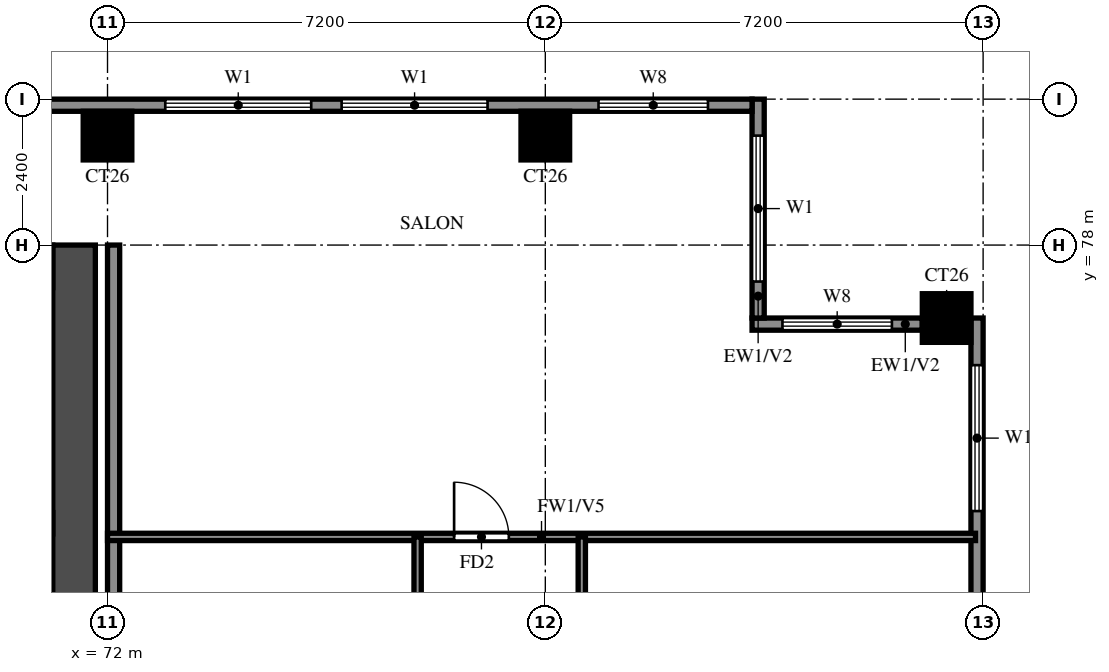
"""IFC4 building model, lengths in metres.
Left out: names, types, materials, properties, quantities, classifications, styles, units other than length and angle.
Written with IfcOpenShell. Run it as: python <this file> out.ifc"""

import sys

from ifc_helpers import new_model, si_unit, direction, frame, frame_2d, origin, origin_2d, place, context, subcontext, project, spatial, rectangle, extrude, source, transform, mapped, element, fill, save


model = new_model("IFC4")
c1 = context("Model", 3, precision=1e-05, world=origin(), true_north=direction((0.0, 1.0)))
c2 = subcontext(c1, "Body", "Model", "MODEL_VIEW")
j1 = project(units=[si_unit("LENGTHUNIT", "METRE"), si_unit("PLANEANGLEUNIT", "RADIAN")], contexts=[c1])
p1 = place(None, origin())
s1 = spatial("IfcSite", under=j1, at=p1, CompositionType="ELEMENT")
p2 = place(p1, origin())
s2 = spatial("IfcBuilding", under=s1, at=p2, CompositionType="ELEMENT")
p3 = place(p2, frame((0.0, 0.0, 178.0)))
s3 = spatial("IfcBuildingStorey", under=s2, at=p3, CompositionType="ELEMENT", Elevation=178.0)
m1 = source(origin(), c2, "Body", "SweptSolid", [
    extrude(rectangle(XDim=0.8, YDim=0.8, at=origin_2d()), origin(), (0.0, 0.0, 1.0), 3.2),
])
for number, where, z_axis, x_axis in (
    (1, (85.8, 76.8, 0.0), (0.0, 0.0, 1.0), (1.0, 0.0, 0.0)),
    (2, (72.0, 79.8, 0.0), (0.0, 0.0, 1.0), (1.0, 0.0, 0.0)),
    (3, (79.2, 79.8, 0.0), (0.0, 0.0, 1.0), (1.0, 0.0, 0.0)),
):
    element("IfcColumn", number, at=place(p3, frame(where, z_axis=z_axis, x_axis=x_axis)), inside=s3, PredefinedType="COLUMN", context=c2, shape_type="MappedRepresentation", body=[
        mapped(m1, transform((0.0, 0.0, 0.0))),
    ])
p4 = place(p3, frame((71.45, 66.1, 0.0), z_axis=(0.0, 0.0, 1.0), x_axis=(0.0, 1.0, 0.0)))
e4 = element("IfcWall", 4, at=p4, inside=s3, PredefinedType="SHEAR", context=c2, shape_type="SweptSolid", body=[
    extrude(rectangle(XDim=11.9, YDim=0.7, at=frame_2d((5.95, 0.0))), origin(), (0.0, 0.0, 1.0), 3.2),
])
p5 = place(p3, frame((29.7, 77.65, 0.0), z_axis=(0.0, 0.0, 1.0), x_axis=(1.0, 0.0, 0.0)))
e5 = element("IfcWall", 5, at=p5, inside=s3, PredefinedType="SHEAR", context=c2, shape_type="SweptSolid", body=[
    extrude(rectangle(XDim=41.4, YDim=0.7, at=frame_2d((20.7, 0.0))), origin(), (0.0, 0.0, 1.0), 3.2),
])
p6 = place(p3, frame((86.3, 48.2, 0.0), z_axis=(0.0, 0.0, 1.0), x_axis=(0.0, 1.0, 0.0)))
e6 = element("IfcWall", 6, at=p6, inside=s3, PredefinedType="SOLIDWALL", context=c2, shape_type="SweptSolid", body=[
    extrude(rectangle(XDim=28.6, YDim=0.2, at=frame_2d((14.3, 0.0))), origin(), (0.0, 0.0, 1.0), 3.2),
])
p7 = place(p6, frame((11.5, 0.0, 0.0)))
e7 = element("IfcOpeningElement", 7, at=p7, cuts=e6, PredefinedType="OPENING", context=c2, shape_type="SweptSolid", body=[
    extrude(rectangle(XDim=1.8, YDim=2.4, at=frame_2d((0.9, 1.2))), frame((0.0, 0.11, 0.0), z_axis=(0.0, -1.0, 0.0), x_axis=(1.0, 0.0, 0.0)), (0.0, 0.0, 1.0), 0.22),
])
p8 = place(p6, frame((0.783, 0.0, 0.6)))
e8 = element("IfcOpeningElement", 8, at=p8, cuts=e6, PredefinedType="OPENING", context=c2, shape_type="SweptSolid", body=[
    extrude(rectangle(XDim=2.4, YDim=2.4, at=frame_2d((1.2, 1.2))), frame((0.0, 0.11, 0.0), z_axis=(0.0, -1.0, 0.0), x_axis=(1.0, 0.0, 0.0)), (0.0, 0.0, 1.0), 0.22),
])
p9 = place(p6, frame((3.667, 0.0, 0.6)))
e9 = element("IfcOpeningElement", 9, at=p9, cuts=e6, PredefinedType="OPENING", context=c2, shape_type="SweptSolid", body=[
    extrude(rectangle(XDim=2.4, YDim=2.4, at=frame_2d((1.2, 1.2))), frame((0.0, 0.11, 0.0), z_axis=(0.0, -1.0, 0.0), x_axis=(1.0, 0.0, 0.0)), (0.0, 0.0, 1.0), 0.22),
])
p10 = place(p6, frame((7.475, 0.0, 0.6)))
e10 = element("IfcOpeningElement", 10, at=p10, cuts=e6, PredefinedType="OPENING", context=c2, shape_type="SweptSolid", body=[
    extrude(rectangle(XDim=1.8, YDim=2.4, at=frame_2d((0.9, 1.2))), frame((0.0, 0.11, 0.0), z_axis=(0.0, -1.0, 0.0), x_axis=(1.0, 0.0, 0.0)), (0.0, 0.0, 1.0), 0.22),
])
p11 = place(p6, frame((14.675, 0.0, 0.6)))
e11 = element("IfcOpeningElement", 11, at=p11, cuts=e6, PredefinedType="OPENING", context=c2, shape_type="SweptSolid", body=[
    extrude(rectangle(XDim=1.2, YDim=2.4, at=frame_2d((0.6, 1.2))), frame((0.0, 0.11, 0.0), z_axis=(0.0, -1.0, 0.0), x_axis=(1.0, 0.0, 0.0)), (0.0, 0.0, 1.0), 0.22),
])
p12 = place(p6, frame((17.625, 0.0, 0.6)))
e12 = element("IfcOpeningElement", 12, at=p12, cuts=e6, PredefinedType="OPENING", context=c2, shape_type="SweptSolid", body=[
    extrude(rectangle(XDim=2.4, YDim=2.4, at=frame_2d((1.2, 1.2))), frame((0.0, 0.11, 0.0), z_axis=(0.0, -1.0, 0.0), x_axis=(1.0, 0.0, 0.0)), (0.0, 0.0, 1.0), 0.22),
])
p13 = place(p6, frame((22.925, 0.0, 1.5)))
e13 = element("IfcOpeningElement", 13, at=p13, cuts=e6, PredefinedType="OPENING", context=c2, shape_type="SweptSolid", body=[
    extrude(rectangle(XDim=0.9, YDim=0.9, at=frame_2d((0.45, 0.45))), frame((0.0, 0.11, 0.0), z_axis=(0.0, -1.0, 0.0), x_axis=(1.0, 0.0, 0.0)), (0.0, 0.0, 1.0), 0.22),
])
p14 = place(p6, frame((25.425, 0.0, 0.6)))
e14 = element("IfcOpeningElement", 14, at=p14, cuts=e6, PredefinedType="OPENING", context=c2, shape_type="SweptSolid", body=[
    extrude(rectangle(XDim=2.4, YDim=2.4, at=frame_2d((1.2, 1.2))), frame((0.0, 0.11, 0.0), z_axis=(0.0, -1.0, 0.0), x_axis=(1.0, 0.0, 0.0)), (0.0, 0.0, 1.0), 0.22),
])
p15 = place(p3, frame((85.4, 76.7, 0.0), z_axis=(0.0, 0.0, 1.0), x_axis=(-1.0, 0.0, 0.0)))
e15 = element("IfcWall", 15, at=p15, inside=s3, PredefinedType="SOLIDWALL", context=c2, shape_type="SweptSolid", body=[
    extrude(rectangle(XDim=2.8, YDim=0.2, at=frame_2d((1.4, 0.0))), origin(), (0.0, 0.0, 1.0), 3.2),
])
p16 = place(p15, frame((0.5, 0.0, 0.6)))
e16 = element("IfcOpeningElement", 16, at=p16, cuts=e15, PredefinedType="OPENING", context=c2, shape_type="SweptSolid", body=[
    extrude(rectangle(XDim=1.8, YDim=2.4, at=frame_2d((0.9, 1.2))), frame((0.0, 0.11, 0.0), z_axis=(0.0, -1.0, 0.0), x_axis=(1.0, 0.0, 0.0)), (0.0, 0.0, 1.0), 0.22),
])
p17 = place(p3, frame((82.7, 76.8, 0.0), z_axis=(0.0, 0.0, 1.0), x_axis=(0.0, 1.0, 0.0)))
e17 = element("IfcWall", 17, at=p17, inside=s3, PredefinedType="SOLIDWALL", context=c2, shape_type="SweptSolid", body=[
    extrude(rectangle(XDim=3.6, YDim=0.2, at=frame_2d((1.8, 0.0))), origin(), (0.0, 0.0, 1.0), 3.2),
])
p18 = place(p17, frame((0.6, 0.0, 0.6)))
e18 = element("IfcOpeningElement", 18, at=p18, cuts=e17, PredefinedType="OPENING", context=c2, shape_type="SweptSolid", body=[
    extrude(rectangle(XDim=2.4, YDim=2.4, at=frame_2d((1.2, 1.2))), frame((0.0, 0.11, 0.0), z_axis=(0.0, -1.0, 0.0), x_axis=(1.0, 0.0, 0.0)), (0.0, 0.0, 1.0), 0.22),
])
p19 = place(p3, frame((82.6, 80.3, 0.0), z_axis=(0.0, 0.0, 1.0), x_axis=(-1.0, 0.0, 0.0)))
e19 = element("IfcWall", 19, at=p19, inside=s3, PredefinedType="SOLIDWALL", context=c2, shape_type="SweptSolid", body=[
    extrude(rectangle(XDim=53.8, YDim=0.2, at=frame_2d((26.9, 0.0))), origin(), (0.0, 0.0, 1.0), 3.2),
])
p20 = place(p19, frame((0.725, 0.0, 0.6)))
e20 = element("IfcOpeningElement", 20, at=p20, cuts=e19, PredefinedType="OPENING", context=c2, shape_type="SweptSolid", body=[
    extrude(rectangle(XDim=1.8, YDim=2.4, at=frame_2d((0.9, 1.2))), frame((0.0, 0.11, 0.0), z_axis=(0.0, -1.0, 0.0), x_axis=(1.0, 0.0, 0.0)), (0.0, 0.0, 1.0), 0.22),
])
p21 = place(p19, frame((4.35, 0.0, 0.6)))
e21 = element("IfcOpeningElement", 21, at=p21, cuts=e19, PredefinedType="OPENING", context=c2, shape_type="SweptSolid", body=[
    extrude(rectangle(XDim=2.4, YDim=2.4, at=frame_2d((1.2, 1.2))), frame((0.0, 0.11, 0.0), z_axis=(0.0, -1.0, 0.0), x_axis=(1.0, 0.0, 0.0)), (0.0, 0.0, 1.0), 0.22),
])
p22 = place(p19, frame((7.25, 0.0, 0.6)))
e22 = element("IfcOpeningElement", 22, at=p22, cuts=e19, PredefinedType="OPENING", context=c2, shape_type="SweptSolid", body=[
    extrude(rectangle(XDim=2.4, YDim=2.4, at=frame_2d((1.2, 1.2))), frame((0.0, 0.11, 0.0), z_axis=(0.0, -1.0, 0.0), x_axis=(1.0, 0.0, 0.0)), (0.0, 0.0, 1.0), 0.22),
])
p23 = place(p3, frame((72.1, 62.4, 0.0), z_axis=(0.0, 0.0, 1.0), x_axis=(0.0, 1.0, 0.0)))
e23 = element("IfcWall", 23, at=p23, inside=s3, PredefinedType="SOLIDWALL", context=c2, shape_type="SweptSolid", body=[
    extrude(rectangle(XDim=15.6, YDim=0.2, at=frame_2d((7.8, 0.0))), origin(), (0.0, 0.0, 1.0), 3.2),
])
p24 = place(p3, frame((72.0, 73.2, 0.0), z_axis=(0.0, 0.0, 1.0), x_axis=(1.0, 0.0, 0.0)))
e24 = element("IfcWall", 24, at=p24, inside=s3, PredefinedType="PARTITIONING", context=c2, shape_type="SweptSolid", body=[
    extrude(rectangle(XDim=14.275, YDim=0.12, at=frame_2d((7.137, 0.0))), origin(), (0.0, 0.0, 1.0), 2.3),
])
p25 = place(p24, frame((5.7, 0.0, 0.0)))
e25 = element("IfcOpeningElement", 25, at=p25, cuts=e24, PredefinedType="OPENING", context=c2, shape_type="SweptSolid", body=[
    extrude(rectangle(XDim=0.9, YDim=2.1, at=frame_2d((0.45, 1.05))), frame((0.0, 0.07, 0.0), z_axis=(0.0, -1.0, 0.0), x_axis=(1.0, 0.0, 0.0)), (0.0, 0.0, 1.0), 0.14),
])
p26 = place(p3, frame((77.1, 61.2, 0.0), z_axis=(0.0, 0.0, 1.0), x_axis=(0.0, 1.0, 0.0)))
e26 = element("IfcWall", 26, at=p26, inside=s3, PredefinedType="PARTITIONING", context=c2, shape_type="SweptSolid", body=[
    extrude(rectangle(XDim=12.0, YDim=0.12, at=frame_2d((6.0, 0.0))), origin(), (0.0, 0.0, 1.0), 3.2),
])
p27 = place(p26, frame((4.55, 0.0, 0.0)))
e27 = element("IfcOpeningElement", 27, at=p27, cuts=e26, PredefinedType="OPENING", context=c2, shape_type="SweptSolid", body=[
    extrude(rectangle(XDim=0.9, YDim=2.1, at=frame_2d((0.45, 1.05))), frame((0.0, 0.07, 0.0), z_axis=(0.0, -1.0, 0.0), x_axis=(1.0, 0.0, 0.0)), (0.0, 0.0, 1.0), 0.14),
])
p28 = place(p26, frame((9.3, 0.0, 0.0)))
e28 = element("IfcOpeningElement", 28, at=p28, cuts=e26, PredefinedType="OPENING", context=c2, shape_type="SweptSolid", body=[
    extrude(rectangle(XDim=0.8, YDim=2.1, at=frame_2d((0.4, 1.05))), frame((0.0, 0.07, 0.0), z_axis=(0.0, -1.0, 0.0), x_axis=(1.0, 0.0, 0.0)), (0.0, 0.0, 1.0), 0.14),
])
p29 = place(p3, frame((79.8, 69.6, 0.0), z_axis=(0.0, 0.0, 1.0), x_axis=(0.0, 1.0, 0.0)))
e29 = element("IfcWall", 29, at=p29, inside=s3, PredefinedType="PARTITIONING", context=c2, shape_type="SweptSolid", body=[
    extrude(rectangle(XDim=3.6, YDim=0.12, at=frame_2d((1.8, 0.0))), origin(), (0.0, 0.0, 1.0), 3.2),
])
p30 = place(p14, origin())
e30 = element("IfcWindow", 30, at=p30, inside=s3, PartitioningType="DOUBLE_PANEL_VERTICAL", PredefinedType="WINDOW", context=c2, shape_type="SweptSolid", body=[
    extrude(rectangle(XDim=2.4, YDim=2.4, at=frame_2d((1.2, 1.2))), frame((0.0, 0.03, 0.0), z_axis=(0.0, -1.0, 0.0), x_axis=(1.0, 0.0, 0.0)), (0.0, 0.0, 1.0), 0.06),
])
fill(e14, e30)
p31 = place(p16, origin())
e31 = element("IfcWindow", 31, at=p31, inside=s3, PartitioningType="DOUBLE_PANEL_VERTICAL", PredefinedType="WINDOW", context=c2, shape_type="SweptSolid", body=[
    extrude(rectangle(XDim=1.8, YDim=2.4, at=frame_2d((0.9, 1.2))), frame((0.0, 0.03, 0.0), z_axis=(0.0, -1.0, 0.0), x_axis=(1.0, 0.0, 0.0)), (0.0, 0.0, 1.0), 0.06),
])
fill(e16, e31)
p32 = place(p18, origin())
e32 = element("IfcWindow", 32, at=p32, inside=s3, PartitioningType="DOUBLE_PANEL_VERTICAL", PredefinedType="WINDOW", context=c2, shape_type="SweptSolid", body=[
    extrude(rectangle(XDim=2.4, YDim=2.4, at=frame_2d((1.2, 1.2))), frame((0.0, 0.03, 0.0), z_axis=(0.0, -1.0, 0.0), x_axis=(1.0, 0.0, 0.0)), (0.0, 0.0, 1.0), 0.06),
])
fill(e18, e32)
p33 = place(p20, origin())
e33 = element("IfcWindow", 33, at=p33, inside=s3, PartitioningType="DOUBLE_PANEL_VERTICAL", PredefinedType="WINDOW", context=c2, shape_type="SweptSolid", body=[
    extrude(rectangle(XDim=1.8, YDim=2.4, at=frame_2d((0.9, 1.2))), frame((0.0, 0.03, 0.0), z_axis=(0.0, -1.0, 0.0), x_axis=(1.0, 0.0, 0.0)), (0.0, 0.0, 1.0), 0.06),
])
fill(e20, e33)
p34 = place(p21, origin())
e34 = element("IfcWindow", 34, at=p34, inside=s3, PartitioningType="DOUBLE_PANEL_VERTICAL", PredefinedType="WINDOW", context=c2, shape_type="SweptSolid", body=[
    extrude(rectangle(XDim=2.4, YDim=2.4, at=frame_2d((1.2, 1.2))), frame((0.0, 0.03, 0.0), z_axis=(0.0, -1.0, 0.0), x_axis=(1.0, 0.0, 0.0)), (0.0, 0.0, 1.0), 0.06),
])
fill(e21, e34)
p35 = place(p22, origin())
e35 = element("IfcWindow", 35, at=p35, inside=s3, PartitioningType="DOUBLE_PANEL_VERTICAL", PredefinedType="WINDOW", context=c2, shape_type="SweptSolid", body=[
    extrude(rectangle(XDim=2.4, YDim=2.4, at=frame_2d((1.2, 1.2))), frame((0.0, 0.03, 0.0), z_axis=(0.0, -1.0, 0.0), x_axis=(1.0, 0.0, 0.0)), (0.0, 0.0, 1.0), 0.06),
])
fill(e22, e35)
p36 = place(p25, origin())
e36 = element("IfcDoor", 36, at=p36, inside=s3, OperationType="SINGLE_SWING_RIGHT", PredefinedType="DOOR", context=c2, shape_type="SweptSolid", body=[
    extrude(rectangle(XDim=0.9, YDim=2.1, at=frame_2d((0.45, 1.05))), frame((0.0, 0.025, 0.0), z_axis=(0.0, -1.0, 0.0), x_axis=(1.0, 0.0, 0.0)), (0.0, 0.0, 1.0), 0.05),
])
fill(e25, e36)
save(model, sys.argv[1])
